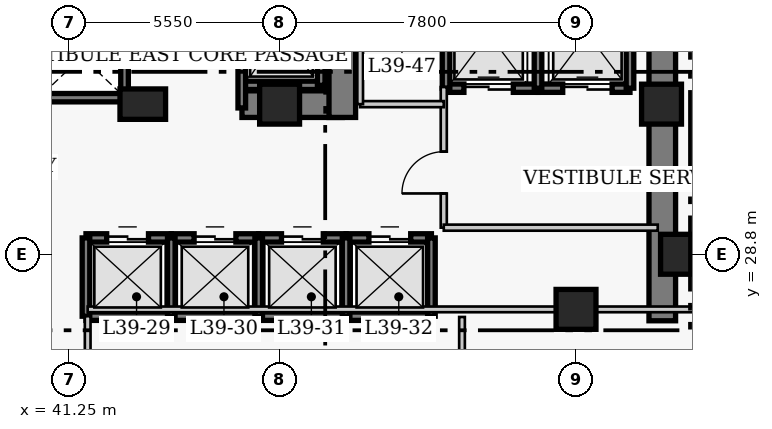
"""IFC4 building model, lengths in metres.
Left out: names, types, materials, properties, quantities, classifications, styles, units other than length and angle.
Written with IfcOpenShell. Run it as: python <this file> out.ifc"""

import sys

from ifc_helpers import new_model, si_unit, direction, frame, frame_2d, origin, origin_2d, place, context, subcontext, project, spatial, rectangle, extrude, element, fill, save


model = new_model("IFC4")
c1 = context("Model", 3, precision=1e-05, world=origin(), true_north=direction((0.0, 1.0)))
c2 = subcontext(c1, "Body", "Model", "MODEL_VIEW")
j1 = project(units=[si_unit("LENGTHUNIT", "METRE"), si_unit("PLANEANGLEUNIT", "RADIAN")], contexts=[c1])
p1 = place(None, origin())
s1 = spatial("IfcSite", under=j1, at=p1, CompositionType="ELEMENT")
p2 = place(p1, origin())
s2 = spatial("IfcBuilding", under=s1, at=p2, CompositionType="ELEMENT")
p3 = place(p2, frame((0.0, 0.0, 157.4)))
s3 = spatial("IfcBuildingStorey", under=s2, at=p3, CompositionType="ELEMENT", Elevation=157.4)
p4 = place(p3, frame((56.87, 27.05, 0.0), z_axis=(0.0, 0.0, 1.0), x_axis=(0.0, 1.0, 0.0)))
e1 = element("IfcWall", 1, at=p4, inside=s3, PredefinedType="SHEAR", context=c2, shape_type="SweptSolid", body=[
    extrude(rectangle(XDim=13.62, YDim=0.7, at=frame_2d((6.81, 0.0))), origin(), (0.0, 0.0, 1.0), 3.8),
])
p5 = place(p3, frame((45.81, 32.75, 0.0), z_axis=(0.0, 0.0, 1.0), x_axis=(1.0, 0.0, 0.0)))
e2 = element("IfcWall", 2, at=p5, inside=s3, PredefinedType="SHEAR", context=c2, shape_type="SweptSolid", body=[
    extrude(rectangle(XDim=2.64, YDim=0.7, at=frame_2d((1.32, 0.0))), origin(), (0.0, 0.0, 1.0), 3.8),
])
p6 = place(p3, frame((48.45, 32.4, 0.0), z_axis=(0.0, 0.0, 1.0), x_axis=(0.0, 1.0, 0.0)))
e3 = element("IfcWall", 3, at=p6, inside=s3, PredefinedType="SHEAR", context=c2, shape_type="SweptSolid", body=[
    extrude(rectangle(XDim=7.92, YDim=0.7, at=frame_2d((3.96, 0.0))), origin(), (0.0, 0.0, 1.0), 3.8),
])
p7 = place(p6, frame((5.8, 0.0, 0.0)))
e4 = element("IfcOpeningElement", 4, at=p7, cuts=e3, PredefinedType="OPENING", context=c2, shape_type="SweptSolid", body=[
    extrude(rectangle(XDim=1.1, YDim=2.15, at=frame_2d((0.55, 1.075))), frame((0.0, 0.36, 0.0), z_axis=(0.0, -1.0, 0.0), x_axis=(1.0, 0.0, 0.0)), (0.0, 0.0, 1.0), 0.72),
])
p8 = place(p3, frame((57.35, 28.8, 0.0), z_axis=(0.0, 0.0, 1.0), x_axis=(1.0, 0.0, 0.0)))
e5 = element("IfcColumn", 5, at=p8, inside=s3, PredefinedType="COLUMN", context=c2, shape_type="SweptSolid", body=[
    extrude(rectangle(XDim=1.05, YDim=1.05, at=origin_2d()), origin(), (0.0, 0.0, 1.0), 3.8),
])
p9 = place(p3, frame((43.2, 32.75, 0.0), z_axis=(0.0, 0.0, 1.0), x_axis=(1.0, 0.0, 0.0)))
e6 = element("IfcColumn", 6, at=p9, inside=s3, PredefinedType="COLUMN", context=c2, shape_type="SweptSolid", body=[
    extrude(rectangle(XDim=1.2, YDim=0.8, at=origin_2d()), origin(), (0.0, 0.0, 1.0), 3.8),
])
for number, where, z_axis, x_axis in (
    (7, (46.8, 32.75, 0.0), (0.0, 0.0, 1.0), (1.0, 0.0, 0.0)),
    (8, (54.6, 27.35, 0.0), (0.0, 0.0, 1.0), (1.0, 0.0, 0.0)),
    (9, (56.85, 32.75, 0.0), (0.0, 0.0, 1.0), (1.0, 0.0, 0.0)),
):
    element("IfcColumn", number, at=place(p3, frame(where, z_axis=z_axis, x_axis=x_axis)), inside=s3, PredefinedType="COLUMN", context=c2, shape_type="SweptSolid", body=[
        extrude(rectangle(XDim=1.05, YDim=1.05, at=origin_2d()), origin(), (0.0, 0.0, 1.0), 3.8),
    ])
p10 = place(p3, frame((41.705, 29.23, 0.0), z_axis=(0.0, 0.0, 1.0), x_axis=(1.0, 0.0, 0.0)))
e10 = element("IfcWall", 10, at=p10, inside=s3, PredefinedType="SHEAR", context=c2, shape_type="SweptSolid", body=[
    extrude(rectangle(XDim=2.245, YDim=0.22, at=frame_2d((1.123, 0.0))), origin(), (0.0, 0.0, 1.0), 3.8),
])
p11 = place(p10, frame((0.545, 0.0, 0.0)))
e11 = element("IfcOpeningElement", 11, at=p11, cuts=e10, PredefinedType="OPENING", context=c2, shape_type="SweptSolid", body=[
    extrude(rectangle(XDim=1.1, YDim=2.15, at=frame_2d((0.55, 1.075))), frame((0.0, 0.12, 0.0), z_axis=(0.0, -1.0, 0.0), x_axis=(1.0, 0.0, 0.0)), (0.0, 0.0, 1.0), 0.24),
])
p12 = place(p3, frame((41.705, 27.17, 0.0), z_axis=(0.0, 0.0, 1.0), x_axis=(1.0, 0.0, 0.0)))
e12 = element("IfcWall", 12, at=p12, inside=s3, PredefinedType="SHEAR", context=c2, shape_type="SweptSolid", body=[
    extrude(rectangle(XDim=2.245, YDim=0.22, at=frame_2d((1.123, 0.0))), origin(), (0.0, 0.0, 1.0), 3.8),
])
p13 = place(p3, frame((41.705, 27.17, 0.0), z_axis=(0.0, 0.0, 1.0), x_axis=(0.0, 1.0, 0.0)))
e13 = element("IfcWall", 13, at=p13, inside=s3, PredefinedType="SHEAR", context=c2, shape_type="SweptSolid", body=[
    extrude(rectangle(XDim=2.06, YDim=0.2, at=frame_2d((1.03, 0.0))), origin(), (0.0, 0.0, 1.0), 3.8),
])
p14 = place(p3, frame((43.95, 29.23, 0.0), z_axis=(0.0, 0.0, 1.0), x_axis=(1.0, 0.0, 0.0)))
e14 = element("IfcWall", 14, at=p14, inside=s3, PredefinedType="SHEAR", context=c2, shape_type="SweptSolid", body=[
    extrude(rectangle(XDim=2.3, YDim=0.22, at=frame_2d((1.15, 0.0))), origin(), (0.0, 0.0, 1.0), 3.8),
])
p15 = place(p14, frame((0.6, 0.0, 0.0)))
e15 = element("IfcOpeningElement", 15, at=p15, cuts=e14, PredefinedType="OPENING", context=c2, shape_type="SweptSolid", body=[
    extrude(rectangle(XDim=1.1, YDim=2.15, at=frame_2d((0.55, 1.075))), frame((0.0, 0.12, 0.0), z_axis=(0.0, -1.0, 0.0), x_axis=(1.0, 0.0, 0.0)), (0.0, 0.0, 1.0), 0.24),
])
p16 = place(p3, frame((43.95, 27.17, 0.0), z_axis=(0.0, 0.0, 1.0), x_axis=(1.0, 0.0, 0.0)))
e16 = element("IfcWall", 16, at=p16, inside=s3, PredefinedType="SHEAR", context=c2, shape_type="SweptSolid", body=[
    extrude(rectangle(XDim=2.3, YDim=0.22, at=frame_2d((1.15, 0.0))), origin(), (0.0, 0.0, 1.0), 3.8),
])
p17 = place(p3, frame((43.95, 27.17, 0.0), z_axis=(0.0, 0.0, 1.0), x_axis=(0.0, 1.0, 0.0)))
e17 = element("IfcWall", 17, at=p17, inside=s3, PredefinedType="SHEAR", context=c2, shape_type="SweptSolid", body=[
    extrude(rectangle(XDim=2.06, YDim=0.2, at=frame_2d((1.03, 0.0))), origin(), (0.0, 0.0, 1.0), 3.8),
])
p18 = place(p3, frame((46.25, 29.23, 0.0), z_axis=(0.0, 0.0, 1.0), x_axis=(1.0, 0.0, 0.0)))
e18 = element("IfcWall", 18, at=p18, inside=s3, PredefinedType="SHEAR", context=c2, shape_type="SweptSolid", body=[
    extrude(rectangle(XDim=2.3, YDim=0.22, at=frame_2d((1.15, 0.0))), origin(), (0.0, 0.0, 1.0), 3.8),
])
p19 = place(p18, frame((0.6, 0.0, 0.0)))
e19 = element("IfcOpeningElement", 19, at=p19, cuts=e18, PredefinedType="OPENING", context=c2, shape_type="SweptSolid", body=[
    extrude(rectangle(XDim=1.1, YDim=2.15, at=frame_2d((0.55, 1.075))), frame((0.0, 0.12, 0.0), z_axis=(0.0, -1.0, 0.0), x_axis=(1.0, 0.0, 0.0)), (0.0, 0.0, 1.0), 0.24),
])
p20 = place(p3, frame((46.25, 27.17, 0.0), z_axis=(0.0, 0.0, 1.0), x_axis=(1.0, 0.0, 0.0)))
e20 = element("IfcWall", 20, at=p20, inside=s3, PredefinedType="SHEAR", context=c2, shape_type="SweptSolid", body=[
    extrude(rectangle(XDim=2.3, YDim=0.22, at=frame_2d((1.15, 0.0))), origin(), (0.0, 0.0, 1.0), 3.8),
])
p21 = place(p3, frame((46.25, 27.17, 0.0), z_axis=(0.0, 0.0, 1.0), x_axis=(0.0, 1.0, 0.0)))
e21 = element("IfcWall", 21, at=p21, inside=s3, PredefinedType="SHEAR", context=c2, shape_type="SweptSolid", body=[
    extrude(rectangle(XDim=2.06, YDim=0.2, at=frame_2d((1.03, 0.0))), origin(), (0.0, 0.0, 1.0), 3.8),
])
p22 = place(p3, frame((48.55, 29.23, 0.0), z_axis=(0.0, 0.0, 1.0), x_axis=(1.0, 0.0, 0.0)))
e22 = element("IfcWall", 22, at=p22, inside=s3, PredefinedType="SHEAR", context=c2, shape_type="SweptSolid", body=[
    extrude(rectangle(XDim=2.245, YDim=0.22, at=frame_2d((1.123, 0.0))), origin(), (0.0, 0.0, 1.0), 3.8),
])
p23 = place(p22, frame((0.6, 0.0, 0.0)))
e23 = element("IfcOpeningElement", 23, at=p23, cuts=e22, PredefinedType="OPENING", context=c2, shape_type="SweptSolid", body=[
    extrude(rectangle(XDim=1.1, YDim=2.15, at=frame_2d((0.55, 1.075))), frame((0.0, 0.12, 0.0), z_axis=(0.0, -1.0, 0.0), x_axis=(1.0, 0.0, 0.0)), (0.0, 0.0, 1.0), 0.24),
])
p24 = place(p3, frame((48.55, 27.17, 0.0), z_axis=(0.0, 0.0, 1.0), x_axis=(1.0, 0.0, 0.0)))
e24 = element("IfcWall", 24, at=p24, inside=s3, PredefinedType="SHEAR", context=c2, shape_type="SweptSolid", body=[
    extrude(rectangle(XDim=2.245, YDim=0.22, at=frame_2d((1.123, 0.0))), origin(), (0.0, 0.0, 1.0), 3.8),
])
for number, where, z_axis, x_axis in (
    (25, (48.55, 27.17, 0.0), (0.0, 0.0, 1.0), (0.0, 1.0, 0.0)),
    (26, (50.795, 27.17, 0.0), (0.0, 0.0, 1.0), (0.0, 1.0, 0.0)),
):
    element("IfcWall", number, at=place(p3, frame(where, z_axis=z_axis, x_axis=x_axis)), inside=s3, PredefinedType="SHEAR", context=c2, shape_type="SweptSolid", body=[
        extrude(rectangle(XDim=2.06, YDim=0.2, at=frame_2d((1.03, 0.0))), origin(), (0.0, 0.0, 1.0), 3.8),
    ])
p25 = place(p3, frame((40.4, 32.92, 0.0), z_axis=(0.0, 0.0, 1.0), x_axis=(1.0, 0.0, 0.0)))
e27 = element("IfcWall", 27, at=p25, inside=s3, PredefinedType="SHEAR", context=c2, shape_type="SweptSolid", body=[
    extrude(rectangle(XDim=2.32, YDim=0.22, at=frame_2d((1.16, 0.0))), origin(), (0.0, 0.0, 1.0), 3.8),
])
p26 = place(p3, frame((42.72, 32.92, 0.0), z_axis=(0.0, 0.0, 1.0), x_axis=(0.0, 1.0, 0.0)))
e28 = element("IfcWall", 28, at=p26, inside=s3, PredefinedType="SHEAR", context=c2, shape_type="SweptSolid", body=[
    extrude(rectangle(XDim=2.16, YDim=0.2, at=frame_2d((1.08, 0.0))), origin(), (0.0, 0.0, 1.0), 3.8),
])
p27 = place(p3, frame((51.18, 33.17, 0.0), z_axis=(0.0, 0.0, 1.0), x_axis=(1.0, 0.0, 0.0)))
e29 = element("IfcWall", 29, at=p27, inside=s3, PredefinedType="SHEAR", context=c2, shape_type="SweptSolid", body=[
    extrude(rectangle(XDim=2.42, YDim=0.22, at=frame_2d((1.21, 0.0))), origin(), (0.0, 0.0, 1.0), 3.8),
])
p28 = place(p27, frame((0.47, 0.0, 0.0)))
e30 = element("IfcOpeningElement", 30, at=p28, cuts=e29, PredefinedType="OPENING", context=c2, shape_type="SweptSolid", body=[
    extrude(rectangle(XDim=1.3, YDim=2.15, at=frame_2d((0.65, 1.075))), frame((0.0, 0.12, 0.0), z_axis=(0.0, -1.0, 0.0), x_axis=(1.0, 0.0, 0.0)), (0.0, 0.0, 1.0), 0.24),
])
p29 = place(p3, frame((51.18, 33.17, 0.0), z_axis=(0.0, 0.0, 1.0), x_axis=(0.0, 1.0, 0.0)))
e31 = element("IfcWall", 31, at=p29, inside=s3, PredefinedType="SHEAR", context=c2, shape_type="SweptSolid", body=[
    extrude(rectangle(XDim=2.86, YDim=0.2, at=frame_2d((1.43, 0.0))), origin(), (0.0, 0.0, 1.0), 3.8),
])
p30 = place(p3, frame((53.6, 33.17, 0.0), z_axis=(0.0, 0.0, 1.0), x_axis=(1.0, 0.0, 0.0)))
e32 = element("IfcWall", 32, at=p30, inside=s3, PredefinedType="SHEAR", context=c2, shape_type="SweptSolid", body=[
    extrude(rectangle(XDim=2.42, YDim=0.22, at=frame_2d((1.21, 0.0))), origin(), (0.0, 0.0, 1.0), 3.8),
])
p31 = place(p30, frame((0.65, 0.0, 0.0)))
e33 = element("IfcOpeningElement", 33, at=p31, cuts=e32, PredefinedType="OPENING", context=c2, shape_type="SweptSolid", body=[
    extrude(rectangle(XDim=1.3, YDim=2.15, at=frame_2d((0.65, 1.075))), frame((0.0, 0.12, 0.0), z_axis=(0.0, -1.0, 0.0), x_axis=(1.0, 0.0, 0.0)), (0.0, 0.0, 1.0), 0.24),
])
for number, where, z_axis, x_axis in (
    (34, (53.6, 33.17, 0.0), (0.0, 0.0, 1.0), (0.0, 1.0, 0.0)),
    (35, (56.02, 33.17, 0.0), (0.0, 0.0, 1.0), (0.0, 1.0, 0.0)),
):
    element("IfcWall", number, at=place(p3, frame(where, z_axis=z_axis, x_axis=x_axis)), inside=s3, PredefinedType="SHEAR", context=c2, shape_type="SweptSolid", body=[
        extrude(rectangle(XDim=2.86, YDim=0.2, at=frame_2d((1.43, 0.0))), origin(), (0.0, 0.0, 1.0), 3.8),
    ])
p32 = place(p3, frame((45.805, 33.245, 0.0), z_axis=(0.0, 0.0, 1.0), x_axis=(1.0, 0.0, 0.0)))
e36 = element("IfcWall", 36, at=p32, inside=s3, PredefinedType="SHEAR", context=c2, shape_type="SweptSolid", body=[
    extrude(rectangle(XDim=2.09, YDim=0.22, at=frame_2d((1.045, 0.0))), origin(), (0.0, 0.0, 1.0), 3.8),
])
p33 = place(p3, frame((45.805, 32.65, 0.0), z_axis=(0.0, 0.0, 1.0), x_axis=(0.0, 1.0, 0.0)))
e37 = element("IfcWall", 37, at=p33, inside=s3, PredefinedType="SHEAR", context=c2, shape_type="SweptSolid", body=[
    extrude(rectangle(XDim=3.505, YDim=0.2, at=frame_2d((1.752, 0.0))), origin(), (0.0, 0.0, 1.0), 3.8),
])
p34 = place(p3, frame((47.895, 33.245, 0.0), z_axis=(0.0, 0.0, 1.0), x_axis=(0.0, 1.0, 0.0)))
e38 = element("IfcWall", 38, at=p34, inside=s3, PredefinedType="SHEAR", context=c2, shape_type="SweptSolid", body=[
    extrude(rectangle(XDim=2.91, YDim=0.2, at=frame_2d((1.455, 0.0))), origin(), (0.0, 0.0, 1.0), 3.8),
])
p35 = place(p3, frame((51.12, 29.5, 0.0), z_axis=(0.0, 0.0, 1.0), x_axis=(0.0, 1.0, 0.0)))
e39 = element("IfcWall", 39, at=p35, inside=s3, PredefinedType="PARTITIONING", context=c2, shape_type="SweptSolid", body=[
    extrude(rectangle(XDim=3.7, YDim=0.16, at=frame_2d((1.85, 0.0))), origin(), (0.0, 0.0, 1.0), 3.55),
])
p36 = place(p35, frame((0.9, 0.0, 0.0)))
e40 = element("IfcOpeningElement", 40, at=p36, cuts=e39, PredefinedType="OPENING", context=c2, shape_type="SweptSolid", body=[
    extrude(rectangle(XDim=1.1, YDim=2.15, at=frame_2d((0.55, 1.075))), frame((0.0, 0.09, 0.0), z_axis=(0.0, -1.0, 0.0), x_axis=(1.0, 0.0, 0.0)), (0.0, 0.0, 1.0), 0.18),
])
p37 = place(p3, frame((51.12, 29.5, 0.0), z_axis=(0.0, 0.0, 1.0), x_axis=(1.0, 0.0, 0.0)))
e41 = element("IfcWall", 41, at=p37, inside=s3, PredefinedType="PARTITIONING", context=c2, shape_type="SweptSolid", body=[
    extrude(rectangle(XDim=5.63, YDim=0.16, at=frame_2d((2.815, 0.0))), origin(), (0.0, 0.0, 1.0), 3.55),
])
p38 = place(p3, frame((48.92, 32.75, 0.0), z_axis=(0.0, 0.0, 1.0), x_axis=(1.0, 0.0, 0.0)))
e42 = element("IfcWall", 42, at=p38, inside=s3, PredefinedType="PARTITIONING", context=c2, shape_type="SweptSolid", body=[
    extrude(rectangle(XDim=2.2, YDim=0.16, at=frame_2d((1.1, 0.0))), origin(), (0.0, 0.0, 1.0), 3.55),
])
p39 = place(p3, frame((48.92, 32.75, 0.0), z_axis=(0.0, 0.0, 1.0), x_axis=(0.0, 1.0, 0.0)))
e43 = element("IfcWall", 43, at=p39, inside=s3, PredefinedType="PARTITIONING", context=c2, shape_type="SweptSolid", body=[
    extrude(rectangle(XDim=3.62, YDim=0.15, at=frame_2d((1.81, 0.0))), origin(), (0.0, 0.0, 1.0), 3.55),
])
p40 = place(p3, frame((41.75, 17.96, 0.0), z_axis=(0.0, 0.0, 1.0), x_axis=(0.0, 1.0, 0.0)))
e44 = element("IfcWall", 44, at=p40, inside=s3, PredefinedType="PARTITIONING", context=c2, shape_type="SweptSolid", body=[
    extrude(rectangle(XDim=9.21, YDim=0.15, at=frame_2d((4.605, 0.0))), origin(), (0.0, 0.0, 1.0), 3.55),
])
p41 = place(p3, frame((51.6, 17.96, 0.0), z_axis=(0.0, 0.0, 1.0), x_axis=(0.0, 1.0, 0.0)))
e45 = element("IfcWall", 45, at=p41, inside=s3, PredefinedType="PARTITIONING", context=c2, shape_type="SweptSolid", body=[
    extrude(rectangle(XDim=9.19, YDim=0.15, at=frame_2d((4.595, 0.0))), origin(), (0.0, 0.0, 1.0), 3.55),
])
p42 = place(p3, frame((41.75, 27.35, 0.0), z_axis=(0.0, 0.0, 1.0), x_axis=(1.0, 0.0, 0.0)))
e46 = element("IfcWall", 46, at=p42, inside=s3, PredefinedType="PARTITIONING", context=c2, shape_type="SweptSolid", body=[
    extrude(rectangle(XDim=17.49, YDim=0.15, at=frame_2d((8.745, 0.0))), origin(), (0.0, 0.0, 1.0), 3.55),
])
p43 = place(p11, origin())
e47 = element("IfcDoor", 47, at=p43, inside=s3, OperationType="DOUBLE_DOOR_SLIDING", PredefinedType="DOOR", context=c2, shape_type="SweptSolid", body=[
    extrude(rectangle(XDim=1.1, YDim=2.15, at=frame_2d((0.55, 1.075))), frame((0.0, 0.025, 0.0), z_axis=(0.0, -1.0, 0.0), x_axis=(1.0, 0.0, 0.0)), (0.0, 0.0, 1.0), 0.05),
])
fill(e11, e47)
p44 = place(p15, origin())
e48 = element("IfcDoor", 48, at=p44, inside=s3, OperationType="DOUBLE_DOOR_SLIDING", PredefinedType="DOOR", context=c2, shape_type="SweptSolid", body=[
    extrude(rectangle(XDim=1.1, YDim=2.15, at=frame_2d((0.55, 1.075))), frame((0.0, 0.025, 0.0), z_axis=(0.0, -1.0, 0.0), x_axis=(1.0, 0.0, 0.0)), (0.0, 0.0, 1.0), 0.05),
])
fill(e15, e48)
p45 = place(p19, origin())
e49 = element("IfcDoor", 49, at=p45, inside=s3, OperationType="DOUBLE_DOOR_SLIDING", PredefinedType="DOOR", context=c2, shape_type="SweptSolid", body=[
    extrude(rectangle(XDim=1.1, YDim=2.15, at=frame_2d((0.55, 1.075))), frame((0.0, 0.025, 0.0), z_axis=(0.0, -1.0, 0.0), x_axis=(1.0, 0.0, 0.0)), (0.0, 0.0, 1.0), 0.05),
])
fill(e19, e49)
p46 = place(p23, origin())
e50 = element("IfcDoor", 50, at=p46, inside=s3, OperationType="DOUBLE_DOOR_SLIDING", PredefinedType="DOOR", context=c2, shape_type="SweptSolid", body=[
    extrude(rectangle(XDim=1.1, YDim=2.15, at=frame_2d((0.55, 1.075))), frame((0.0, 0.025, 0.0), z_axis=(0.0, -1.0, 0.0), x_axis=(1.0, 0.0, 0.0)), (0.0, 0.0, 1.0), 0.05),
])
fill(e23, e50)
p47 = place(p28, origin())
e51 = element("IfcDoor", 51, at=p47, inside=s3, OperationType="DOUBLE_DOOR_SLIDING", PredefinedType="DOOR", context=c2, shape_type="SweptSolid", body=[
    extrude(rectangle(XDim=1.3, YDim=2.15, at=frame_2d((0.65, 1.075))), frame((0.0, 0.025, 0.0), z_axis=(0.0, -1.0, 0.0), x_axis=(1.0, 0.0, 0.0)), (0.0, 0.0, 1.0), 0.05),
])
fill(e30, e51)
p48 = place(p31, origin())
e52 = element("IfcDoor", 52, at=p48, inside=s3, OperationType="DOUBLE_DOOR_SLIDING", PredefinedType="DOOR", context=c2, shape_type="SweptSolid", body=[
    extrude(rectangle(XDim=1.3, YDim=2.15, at=frame_2d((0.65, 1.075))), frame((0.0, 0.025, 0.0), z_axis=(0.0, -1.0, 0.0), x_axis=(1.0, 0.0, 0.0)), (0.0, 0.0, 1.0), 0.05),
])
fill(e33, e52)
p49 = place(p36, origin())
e53 = element("IfcDoor", 53, at=p49, inside=s3, OperationType="SINGLE_SWING_LEFT", PredefinedType="DOOR", context=c2, shape_type="SweptSolid", body=[
    extrude(rectangle(XDim=1.1, YDim=2.15, at=frame_2d((0.55, 1.075))), frame((0.0, 0.025, 0.0), z_axis=(0.0, -1.0, 0.0), x_axis=(1.0, 0.0, 0.0)), (0.0, 0.0, 1.0), 0.05),
])
fill(e40, e53)
save(model, sys.argv[1])
